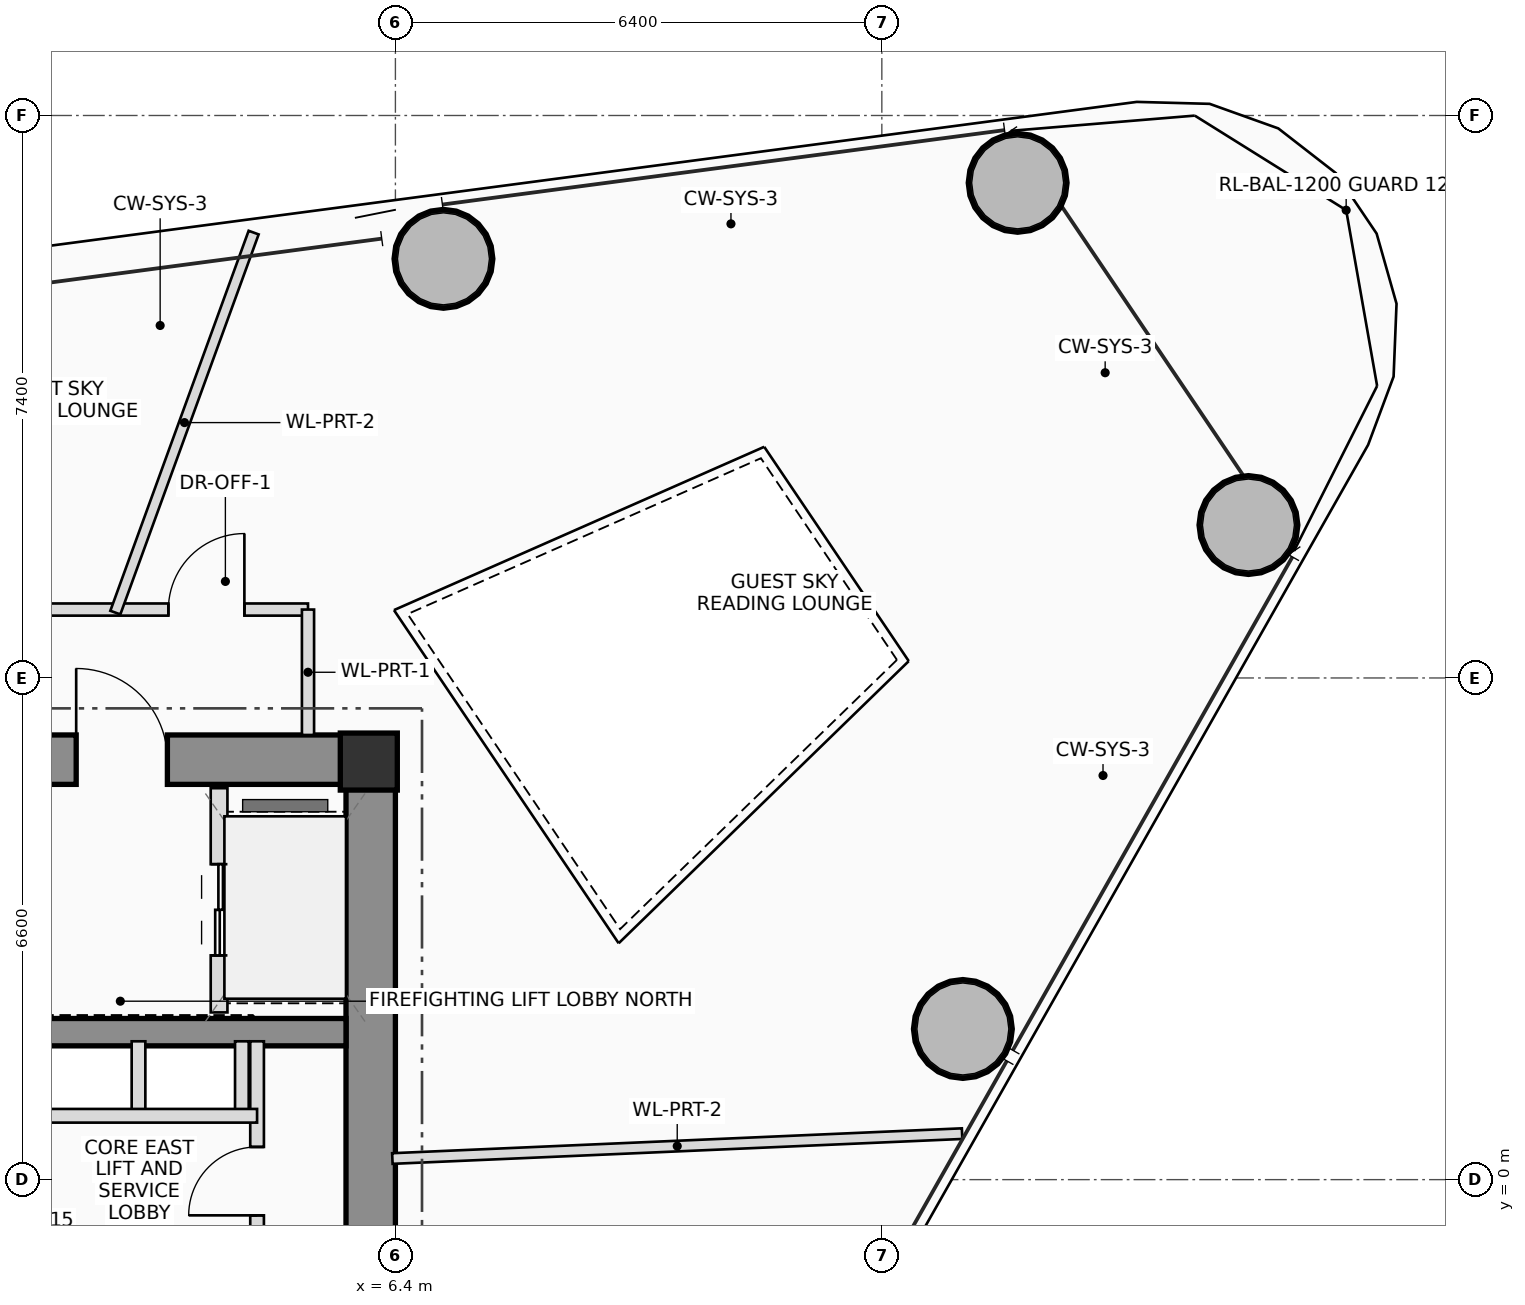
"""IFC4 building model, lengths in metres.
Left out: names, types, materials, properties, quantities, classifications, styles, units other than length and angle.
Written with IfcOpenShell. Run it as: python <this file> out.ifc"""

import sys

from ifc_helpers import new_model, si_unit, direction, frame, frame_2d, origin, origin_2d, place, context, subcontext, project, spatial, rectangle, hollow_circle, extrude, source, transform, mapped, element, fill, save


model = new_model("IFC4")
c1 = context("Model", 3, precision=1e-05, world=origin(), true_north=direction((0.0, 1.0)))
c2 = subcontext(c1, "Body", "Model", "MODEL_VIEW")
j1 = project(units=[si_unit("LENGTHUNIT", "METRE"), si_unit("PLANEANGLEUNIT", "RADIAN")], contexts=[c1])
p1 = place(None, origin())
s1 = spatial("IfcSite", under=j1, at=p1, CompositionType="ELEMENT")
p2 = place(p1, origin())
s2 = spatial("IfcBuilding", under=s1, at=p2, CompositionType="ELEMENT")
p3 = place(p2, frame((0.0, 0.0, 165.65)))
s3 = spatial("IfcBuildingStorey", under=s2, at=p3, CompositionType="ELEMENT", Elevation=165.65)
m1 = source(origin(), c2, "Body", "SweptSolid", [
    extrude(rectangle(XDim=0.75, YDim=0.75, at=origin_2d()), origin(), (0.0, 0.0, 1.0), 3.45),
])
p4 = place(p3, frame((6.05, 5.5, 0.0), z_axis=(0.0, 0.0, 1.0), x_axis=(1.0, 0.0, 0.0)))
e1 = element("IfcColumn", 1, at=p4, inside=s3, PredefinedType="COLUMN", context=c2, shape_type="MappedRepresentation", body=[
    mapped(m1, transform((0.0, 0.0, 0.0), scale=1.0)),
])
p5 = place(p3, frame((-6.4, 5.525, 0.0), z_axis=(0.0, 0.0, 1.0), x_axis=(1.0, 0.0, 0.0)))
e2 = element("IfcWall", 2, at=p5, inside=s3, PredefinedType="SHEAR", context=c2, shape_type="SweptSolid", body=[
    extrude(rectangle(XDim=12.8, YDim=0.65, at=frame_2d((6.4, 0.0))), origin(), (0.0, 0.0, 1.0), 3.45),
])
p6 = place(p5, frame((8.6, 0.0, 0.0)))
e3 = element("IfcOpeningElement", 3, at=p6, cuts=e2, PredefinedType="OPENING", context=c2, shape_type="SweptSolid", body=[
    extrude(rectangle(XDim=1.2, YDim=2.2, at=frame_2d((0.6, 1.1))), frame((0.0, 0.335, 0.0), z_axis=(0.0, -1.0, 0.0), x_axis=(1.0, 0.0, 0.0)), (0.0, 0.0, 1.0), 0.67),
])
p7 = place(p3, frame((6.075, -5.2, 0.0), z_axis=(0.0, 0.0, 1.0), x_axis=(0.0, 1.0, 0.0)))
e4 = element("IfcWall", 4, at=p7, inside=s3, PredefinedType="SHEAR", context=c2, shape_type="SweptSolid", body=[
    extrude(rectangle(XDim=10.4, YDim=0.65, at=frame_2d((5.2, 0.0))), origin(), (0.0, 0.0, 1.0), 3.45),
])
p8 = place(p3, frame((-5.75, 1.94, 0.0), z_axis=(0.0, 0.0, 1.0), x_axis=(1.0, 0.0, 0.0)))
e5 = element("IfcWall", 5, at=p8, inside=s3, PredefinedType="SHEAR", context=c2, shape_type="SweptSolid", body=[
    extrude(rectangle(XDim=11.5, YDim=0.36, at=frame_2d((5.75, 0.0))), origin(), (0.0, 0.0, 1.0), 3.45),
])
m2 = source(origin(), c2, "Body", "SweptSolid", [
    extrude(hollow_circle(Radius=0.65, WallThickness=0.045, at=origin_2d()), origin(), (0.0, 0.0, 1.0), 3.45),
])
for number, where, z_axis, x_axis in (
    (6, (13.866, 1.982, 0.0), (0.0, 0.0, 1.0), (1.0, 0.0, 0.0)),
    (7, (17.624, 8.612, 0.0), (0.0, 0.0, 1.0), (1.0, 0.0, 0.0)),
    (8, (14.587, 13.114, 0.0), (0.0, 0.0, 1.0), (1.0, 0.0, 0.0)),
    (9, (7.032, 12.114, 0.0), (0.0, 0.0, 1.0), (1.0, 0.0, 0.0)),
):
    element("IfcColumn", number, at=place(p3, frame(where, z_axis=z_axis, x_axis=x_axis)), inside=s3, PredefinedType="COLUMN", context=c2, shape_type="MappedRepresentation", body=[
        mapped(m2, transform((0.0, 0.0, 0.0), scale=1.0)),
    ])
p9 = place(p3, frame((4.08, 2.2, 0.0), z_axis=(0.0, 0.0, 1.0), x_axis=(0.0, 1.0, 0.0)))
e10 = element("IfcWall", 10, at=p9, inside=s3, PredefinedType="PLUMBINGWALL", context=c2, shape_type="SweptSolid", body=[
    extrude(rectangle(XDim=2.95, YDim=0.22, at=frame_2d((1.475, 0.0))), origin(), (0.0, 0.0, 1.0), 3.25),
])
p10 = place(p9, frame((0.75, 0.0, 0.0)))
e11 = element("IfcOpeningElement", 11, at=p10, cuts=e10, PredefinedType="OPENING", context=c2, shape_type="SweptSolid", body=[
    extrude(rectangle(XDim=1.2, YDim=2.25, at=frame_2d((0.6, 1.125))), frame((0.0, 0.12, 0.0), z_axis=(0.0, -1.0, 0.0), x_axis=(1.0, 0.0, 0.0)), (0.0, 0.0, 1.0), 0.24),
])
for number, where, z_axis, x_axis in (
    (12, (3.02, 0.84, 0.0), (0.0, 0.0, 1.0), (0.0, 1.0, 0.0)),
    (13, (4.38, 0.84, 0.0), (0.0, 0.0, 1.0), (0.0, 1.0, 0.0)),
):
    element("IfcWall", number, at=place(p3, frame(where, z_axis=z_axis, x_axis=x_axis)), inside=s3, PredefinedType="PLUMBINGWALL", context=c2, shape_type="SweptSolid", body=[
        extrude(rectangle(XDim=0.98, YDim=0.18, at=frame_2d((0.49, 0.0))), origin(), (0.0, 0.0, 1.0), 3.25),
    ])
p11 = place(p3, frame((4.58, -1.82, 0.0), z_axis=(0.0, 0.0, 1.0), x_axis=(0.0, 1.0, 0.0)))
e14 = element("IfcWall", 14, at=p11, inside=s3, PredefinedType="PLUMBINGWALL", context=c2, shape_type="SweptSolid", body=[
    extrude(rectangle(XDim=3.64, YDim=0.18, at=frame_2d((1.82, 0.0))), origin(), (0.0, 0.0, 1.0), 3.25),
])
p12 = place(p11, frame((1.35, 0.0, 0.0)))
e15 = element("IfcOpeningElement", 15, at=p12, cuts=e14, PredefinedType="OPENING", context=c2, shape_type="SweptSolid", body=[
    extrude(rectangle(XDim=0.9, YDim=2.05, at=frame_2d((0.45, 1.025))), frame((0.0, 0.1, 0.0), z_axis=(0.0, -1.0, 0.0), x_axis=(1.0, 0.0, 0.0)), (0.0, 0.0, 1.0), 0.2),
])
p13 = place(p3, frame((-5.68, 0.84, 0.0), z_axis=(0.0, 0.0, 1.0), x_axis=(1.0, 0.0, 0.0)))
e16 = element("IfcWall", 16, at=p13, inside=s3, PredefinedType="PLUMBINGWALL", context=c2, shape_type="SweptSolid", body=[
    extrude(rectangle(XDim=10.26, YDim=0.18, at=frame_2d((5.13, 0.0))), origin(), (0.0, 0.0, 1.0), 3.25),
])
p14 = place(p13, frame((1.08, 0.0, 0.0)))
e17 = element("IfcOpeningElement", 17, at=p14, cuts=e16, PredefinedType="OPENING", context=c2, shape_type="SweptSolid", body=[
    extrude(rectangle(XDim=0.9, YDim=2.05, at=frame_2d((0.45, 1.025))), frame((0.0, 0.1, 0.0), z_axis=(0.0, -1.0, 0.0), x_axis=(1.0, 0.0, 0.0)), (0.0, 0.0, 1.0), 0.2),
])
p15 = place(p13, frame((3.93, 0.0, 0.0)))
e18 = element("IfcOpeningElement", 18, at=p15, cuts=e16, PredefinedType="OPENING", context=c2, shape_type="SweptSolid", body=[
    extrude(rectangle(XDim=1.1, YDim=2.2, at=frame_2d((0.55, 1.1))), frame((0.0, 0.1, 0.0), z_axis=(0.0, -1.0, 0.0), x_axis=(1.0, 0.0, 0.0)), (0.0, 0.0, 1.0), 0.2),
])
p16 = place(p13, frame((5.63, 0.0, 0.0)))
e19 = element("IfcOpeningElement", 19, at=p16, cuts=e16, PredefinedType="OPENING", context=c2, shape_type="SweptSolid", body=[
    extrude(rectangle(XDim=1.1, YDim=2.2, at=frame_2d((0.55, 1.1))), frame((0.0, 0.1, 0.0), z_axis=(0.0, -1.0, 0.0), x_axis=(1.0, 0.0, 0.0)), (0.0, 0.0, 1.0), 0.2),
])
p17 = place(p3, frame((-6.36, 7.5, 0.0), z_axis=(0.0, 0.0, 1.0), x_axis=(1.0, 0.0, 0.0)))
e20 = element("IfcWall", 20, at=p17, inside=s3, PredefinedType="PARTITIONING", context=c2, shape_type="SweptSolid", body=[
    extrude(rectangle(XDim=11.61, YDim=0.16, at=frame_2d((5.805, 0.0))), origin(), (0.0, 0.0, 1.0), 2.605),
])
p18 = place(p17, frame((1.6, 0.0, 0.0)))
e21 = element("IfcOpeningElement", 21, at=p18, cuts=e20, PredefinedType="OPENING", context=c2, shape_type="SweptSolid", body=[
    extrude(rectangle(XDim=1.0, YDim=2.25, at=frame_2d((0.5, 1.125))), frame((0.0, 0.09, 0.0), z_axis=(0.0, -1.0, 0.0), x_axis=(1.0, 0.0, 0.0)), (0.0, 0.0, 1.0), 0.18),
])
p19 = place(p17, frame((6.631, 0.0, 0.0)))
e22 = element("IfcOpeningElement", 22, at=p19, cuts=e20, PredefinedType="OPENING", context=c2, shape_type="SweptSolid", body=[
    extrude(rectangle(XDim=1.0, YDim=2.25, at=frame_2d((0.5, 1.125))), frame((0.0, 0.09, 0.0), z_axis=(0.0, -1.0, 0.0), x_axis=(1.0, 0.0, 0.0)), (0.0, 0.0, 1.0), 0.18),
])
p20 = place(p17, frame((9.773, 0.0, 0.0)))
e23 = element("IfcOpeningElement", 23, at=p20, cuts=e20, PredefinedType="OPENING", context=c2, shape_type="SweptSolid", body=[
    extrude(rectangle(XDim=1.0, YDim=2.25, at=frame_2d((0.5, 1.125))), frame((0.0, 0.09, 0.0), z_axis=(0.0, -1.0, 0.0), x_axis=(1.0, 0.0, 0.0)), (0.0, 0.0, 1.0), 0.18),
])
p21 = place(p3, frame((5.25, 7.5, 0.0), z_axis=(0.0, 0.0, 1.0), x_axis=(0.0, -1.0, 0.0)))
e24 = element("IfcWall", 24, at=p21, inside=s3, PredefinedType="PARTITIONING", context=c2, shape_type="SweptSolid", body=[
    extrude(rectangle(XDim=1.65, YDim=0.16, at=frame_2d((0.825, 0.0))), origin(), (0.0, 0.0, 1.0), 3.25),
])
p22 = place(p3, frame((6.36, 0.278, 0.0), z_axis=(0.0, 0.0, 1.0), x_axis=(0.999047543566, 0.043634913719, 0.0)))
e25 = element("IfcWall", 25, at=p22, inside=s3, PredefinedType="PARTITIONING", context=c2, shape_type="SweptSolid", body=[
    extrude(rectangle(XDim=7.503, YDim=0.14, at=frame_2d((3.751, 0.0))), origin(), (0.0, 0.0, 1.0), 2.605),
])
p23 = place(p3, frame((2.715, 7.46, 0.0), z_axis=(0.0, 0.0, 1.0), x_axis=(0.342045165819, 0.939683512966, 0.0)))
e26 = element("IfcWall", 26, at=p23, inside=s3, PredefinedType="PARTITIONING", context=c2, shape_type="SweptSolid", body=[
    extrude(rectangle(XDim=5.32, YDim=0.14, at=frame_2d((2.66, 0.0))), origin(), (0.0, 0.0, 1.0), 2.605),
])
p24 = place(p6, origin())
e27 = element("IfcDoor", 27, at=p24, inside=s3, OperationType="SINGLE_SWING_LEFT", PredefinedType="DOOR", context=c2, shape_type="SweptSolid", body=[
    extrude(rectangle(XDim=1.2, YDim=2.2, at=frame_2d((0.6, 1.1))), frame((0.0, 0.025, 0.0), z_axis=(0.0, -1.0, 0.0), x_axis=(1.0, 0.0, 0.0)), (0.0, 0.0, 1.0), 0.05),
])
fill(e3, e27)
p25 = place(p10, origin())
e28 = element("IfcDoor", 28, at=p25, inside=s3, OperationType="DOUBLE_DOOR_SLIDING", PredefinedType="DOOR", context=c2, shape_type="SweptSolid", body=[
    extrude(rectangle(XDim=1.2, YDim=2.25, at=frame_2d((0.6, 1.125))), frame((0.0, 0.025, 0.0), z_axis=(0.0, -1.0, 0.0), x_axis=(1.0, 0.0, 0.0)), (0.0, 0.0, 1.0), 0.05),
])
fill(e11, e28)
p26 = place(p12, origin())
e29 = element("IfcDoor", 29, at=p26, inside=s3, OperationType="SINGLE_SWING_LEFT", PredefinedType="DOOR", context=c2, shape_type="SweptSolid", body=[
    extrude(rectangle(XDim=0.9, YDim=2.05, at=frame_2d((0.45, 1.025))), frame((0.0, 0.025, 0.0), z_axis=(0.0, -1.0, 0.0), x_axis=(1.0, 0.0, 0.0)), (0.0, 0.0, 1.0), 0.05),
])
fill(e15, e29)
p27 = place(p20, origin())
e30 = element("IfcDoor", 30, at=p27, inside=s3, OperationType="SINGLE_SWING_RIGHT", PredefinedType="DOOR", context=c2, shape_type="SweptSolid", body=[
    extrude(rectangle(XDim=1.0, YDim=2.25, at=frame_2d((0.5, 1.125))), frame((0.0, 0.025, 0.0), z_axis=(0.0, -1.0, 0.0), x_axis=(1.0, 0.0, 0.0)), (0.0, 0.0, 1.0), 0.05),
])
fill(e23, e30)
save(model, sys.argv[1])
